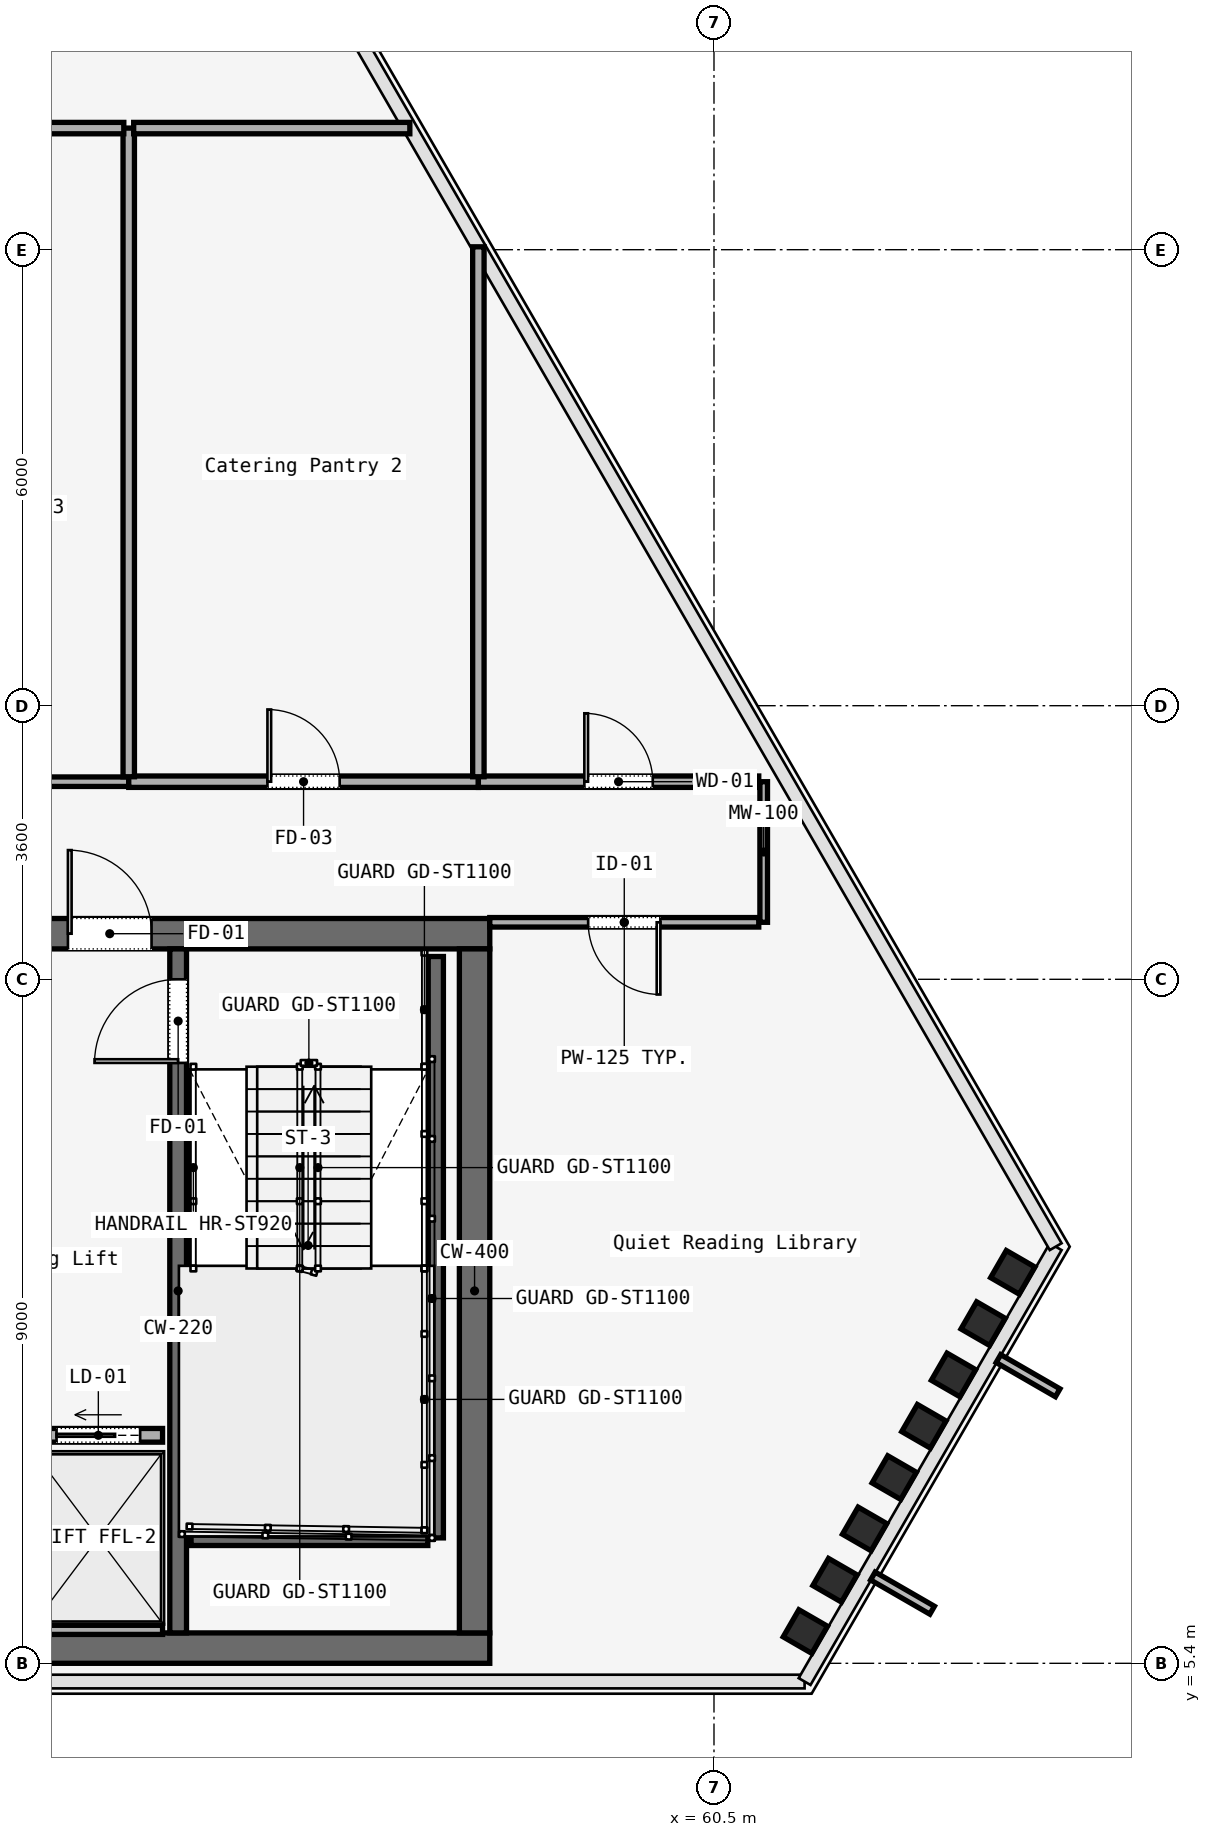
"""IFC4 building model, lengths in metres.
Left out: names, types, materials, properties, quantities, classifications, styles, units other than length and angle.
Written with IfcOpenShell. Run it as: python <this file> out.ifc"""

import sys

from ifc_helpers import new_model, si_unit, direction, frame, frame_2d, origin, origin_2d, place, context, subcontext, project, spatial, rectangle, i_section, extrude, element, fill, save


model = new_model("IFC4")
c1 = context("Model", 3, precision=1e-05, world=origin(), true_north=direction((0.0, 1.0)))
c2 = subcontext(c1, "Body", "Model", "MODEL_VIEW")
j1 = project(units=[si_unit("LENGTHUNIT", "METRE"), si_unit("PLANEANGLEUNIT", "RADIAN")], contexts=[c1])
p1 = place(None, origin())
s1 = spatial("IfcSite", under=j1, at=p1, CompositionType="ELEMENT")
p2 = place(p1, origin())
s2 = spatial("IfcBuilding", under=s1, at=p2, CompositionType="ELEMENT")
p3 = place(p2, frame((0.0, 0.0, 240.8)))
s3 = spatial("IfcBuildingStorey", under=s2, at=p3, CompositionType="ELEMENT", Elevation=240.8)
p4 = place(p3, frame((26.45, 15.0, 0.0), z_axis=(0.0, 0.0, 1.0), x_axis=(1.0, 0.0, 0.0)))
e1 = element("IfcWall", 1, at=p4, inside=s3, PredefinedType="SOLIDWALL", context=c2, shape_type="SweptSolid", body=[
    extrude(rectangle(XDim=31.1, YDim=0.4, at=frame_2d((15.55, 0.0))), origin(), (0.0, 0.0, 1.0), 3.58),
])
p5 = place(p4, frame((1.65, 0.0, 0.0)))
e2 = element("IfcOpeningElement", 2, at=p5, cuts=e1, PredefinedType="OPENING", context=c2, shape_type="SweptSolid", body=[
    extrude(rectangle(XDim=1.1, YDim=2.2, at=frame_2d((0.55, 1.1))), frame((0.0, 0.2, 0.0), z_axis=(0.0, -1.0, 0.0), x_axis=(1.0, 0.0, 0.0)), (0.0, 0.0, 1.0), 0.4),
])
p6 = place(p4, frame((13.65, 0.0, 0.0)))
e3 = element("IfcOpeningElement", 3, at=p6, cuts=e1, PredefinedType="OPENING", context=c2, shape_type="SweptSolid", body=[
    extrude(rectangle(XDim=1.1, YDim=2.2, at=frame_2d((0.55, 1.1))), frame((0.0, 0.2, 0.0), z_axis=(0.0, -1.0, 0.0), x_axis=(1.0, 0.0, 0.0)), (0.0, 0.0, 1.0), 0.4),
])
p7 = place(p4, frame((25.55, 0.0, 0.0)))
e4 = element("IfcOpeningElement", 4, at=p7, cuts=e1, PredefinedType="OPENING", context=c2, shape_type="SweptSolid", body=[
    extrude(rectangle(XDim=1.1, YDim=2.2, at=frame_2d((0.55, 1.1))), frame((0.0, 0.2, 0.0), z_axis=(0.0, -1.0, 0.0), x_axis=(1.0, 0.0, 0.0)), (0.0, 0.0, 1.0), 0.4),
])
p8 = place(p4, frame((19.35, 0.0, 0.0)))
e5 = element("IfcOpeningElement", 5, at=p8, cuts=e1, PredefinedType="OPENING", context=c2, shape_type="SweptSolid", body=[
    extrude(rectangle(XDim=1.1, YDim=2.2, at=frame_2d((0.55, 1.1))), frame((0.0, 0.2, 0.0), z_axis=(0.0, -1.0, 0.0), x_axis=(1.0, 0.0, 0.0)), (0.0, 0.0, 1.0), 0.4),
])
p9 = place(p4, frame((21.4, 0.0, 0.0)))
e6 = element("IfcOpeningElement", 6, at=p9, cuts=e1, PredefinedType="OPENING", context=c2, shape_type="SweptSolid", body=[
    extrude(rectangle(XDim=0.9, YDim=2.1, at=frame_2d((0.45, 1.05))), frame((0.0, 0.2, 0.0), z_axis=(0.0, -1.0, 0.0), x_axis=(1.0, 0.0, 0.0)), (0.0, 0.0, 1.0), 0.4),
])
p10 = place(p4, frame((6.04, 0.0, 0.0)))
e7 = element("IfcOpeningElement", 7, at=p10, cuts=e1, PredefinedType="OPENING", context=c2, shape_type="SweptSolid", body=[
    extrude(rectangle(XDim=0.95, YDim=2.2, at=frame_2d((0.475, 1.1))), frame((0.0, 0.2, 0.0), z_axis=(0.0, -1.0, 0.0), x_axis=(1.0, 0.0, 0.0)), (0.0, 0.0, 1.0), 0.4),
])
p11 = place(p4, frame((9.99, 0.0, 0.0)))
e8 = element("IfcOpeningElement", 8, at=p11, cuts=e1, PredefinedType="OPENING", context=c2, shape_type="SweptSolid", body=[
    extrude(rectangle(XDim=0.95, YDim=2.2, at=frame_2d((0.475, 1.1))), frame((0.0, 0.2, 0.0), z_axis=(0.0, -1.0, 0.0), x_axis=(1.0, 0.0, 0.0)), (0.0, 0.0, 1.0), 0.4),
])
p12 = place(p4, frame((23.35, 0.0, 0.0)))
e9 = element("IfcOpeningElement", 9, at=p12, cuts=e1, PredefinedType="OPENING", context=c2, shape_type="SweptSolid", body=[
    extrude(rectangle(XDim=1.3, YDim=2.3, at=frame_2d((0.65, 1.15))), frame((0.0, 0.2, 0.0), z_axis=(0.0, -1.0, 0.0), x_axis=(1.0, 0.0, 0.0)), (0.0, 0.0, 1.0), 0.4),
])
p13 = place(p3, frame((26.45, 5.6, 0.0), z_axis=(0.0, 0.0, 1.0), x_axis=(1.0, 0.0, 0.0)))
e10 = element("IfcWall", 10, at=p13, inside=s3, PredefinedType="SOLIDWALL", context=c2, shape_type="SweptSolid", body=[
    extrude(rectangle(XDim=31.1, YDim=0.4, at=frame_2d((15.55, 0.0))), origin(), (0.0, 0.0, 1.0), 3.58),
])
p14 = place(p3, frame((57.35, 5.8, 0.0), z_axis=(0.0, 0.0, 1.0), x_axis=(0.0, 1.0, 0.0)))
e11 = element("IfcWall", 11, at=p14, inside=s3, PredefinedType="SOLIDWALL", context=c2, shape_type="SweptSolid", body=[
    extrude(rectangle(XDim=9.0, YDim=0.4, at=frame_2d((4.5, 0.0))), origin(), (0.0, 0.0, 1.0), 3.58),
])
p15 = place(p3, frame((53.45, 5.8, 0.0), z_axis=(0.0, 0.0, 1.0), x_axis=(0.0, 1.0, 0.0)))
e12 = element("IfcWall", 12, at=p15, inside=s3, PredefinedType="SOLIDWALL", context=c2, shape_type="SweptSolid", body=[
    extrude(rectangle(XDim=9.0, YDim=0.22, at=frame_2d((4.5, 0.0))), origin(), (0.0, 0.0, 1.0), 3.58),
])
p16 = place(p15, frame((7.5, 0.0, 0.0)))
e13 = element("IfcOpeningElement", 13, at=p16, cuts=e12, PredefinedType="OPENING", context=c2, shape_type="SweptSolid", body=[
    extrude(rectangle(XDim=1.1, YDim=2.2, at=frame_2d((0.55, 1.1))), frame((0.0, 0.11, 0.0), z_axis=(0.0, -1.0, 0.0), x_axis=(1.0, 0.0, 0.0)), (0.0, 0.0, 1.0), 0.22),
])
for number, where, z_axis, x_axis in (
    (14, (61.702, 5.818, 0.0), (0.0, 0.0, 1.0), (0.5, 0.866, 0.0)),
    (15, (62.092, 6.493, 0.0), (0.0, 0.0, 1.0), (0.5, 0.866, 0.0)),
    (16, (62.482, 7.168, 0.0), (0.0, 0.0, 1.0), (0.5, 0.866, 0.0)),
    (17, (62.872, 7.844, 0.0), (0.0, 0.0, 1.0), (0.5, 0.866, 0.0)),
    (18, (63.262, 8.519, 0.0), (0.0, 0.0, 1.0), (0.5, 0.866, 0.0)),
    (19, (63.652, 9.194, 0.0), (0.0, 0.0, 1.0), (0.5, 0.866, 0.0)),
    (20, (64.041, 9.869, 0.0), (0.0, 0.0, 1.0), (0.5, 0.866, 0.0)),
    (21, (64.431, 10.544, 0.0), (0.0, 0.0, 1.0), (0.5, 0.866, 0.0)),
):
    element("IfcColumn", number, at=place(p3, frame(where, z_axis=z_axis, x_axis=x_axis)), inside=s3, PredefinedType="COLUMN", context=c2, shape_type="SweptSolid", body=[
        extrude(i_section(OverallWidth=0.412, OverallDepth=0.435, WebThickness=0.036, FlangeThickness=0.044, FilletRadius=0.015, at=origin_2d()), origin(), (0.0, 0.0, 1.0), 3.58),
    ])
p17 = place(p3, frame((56.84, 14.7, 0.0), z_axis=(0.0, 0.0, 1.0), x_axis=(0.0, -1.0, 0.0)))
e22 = element("IfcWall", 22, at=p17, inside=s3, PredefinedType="SOLIDWALL", context=c2, shape_type="SweptSolid", body=[
    extrude(rectangle(XDim=7.65, YDim=0.2, at=frame_2d((3.825, 0.0))), origin(), (0.0, 0.0, 1.0), 3.8),
])
p18 = place(p3, frame((53.62, 7.05, 0.0), z_axis=(0.0, 0.0, 1.0), x_axis=(1.0, 0.0, 0.0)))
e23 = element("IfcWall", 23, at=p18, inside=s3, PredefinedType="SOLIDWALL", context=c2, shape_type="SweptSolid", body=[
    extrude(rectangle(XDim=3.115, YDim=0.2, at=frame_2d((1.558, 0.0))), origin(), (0.0, 0.0, 1.0), 3.8),
])
p19 = place(p3, frame((51.555, 8.4, 0.0), z_axis=(0.0, 0.0, 1.0), x_axis=(1.0, 0.0, 0.0)))
e24 = element("IfcWall", 24, at=p19, inside=s3, PredefinedType="SOLIDWALL", context=c2, shape_type="SweptSolid", body=[
    extrude(rectangle(XDim=1.69, YDim=0.18, at=frame_2d((0.845, 0.0))), origin(), (0.0, 0.0, 1.0), 3.01),
])
p20 = place(p19, frame((0.295, 0.0, 0.0)))
e25 = element("IfcOpeningElement", 25, at=p20, cuts=e24, PredefinedType="OPENING", context=c2, shape_type="SweptSolid", body=[
    extrude(rectangle(XDim=1.1, YDim=2.2, at=frame_2d((0.55, 1.1))), frame((0.0, 0.09, 0.0), z_axis=(0.0, -1.0, 0.0), x_axis=(1.0, 0.0, 0.0)), (0.0, 0.0, 1.0), 0.18),
])
p21 = place(p3, frame((51.555, 5.84, 0.0), z_axis=(0.0, 0.0, 1.0), x_axis=(1.0, 0.0, 0.0)))
e26 = element("IfcWall", 26, at=p21, inside=s3, PredefinedType="SOLIDWALL", context=c2, shape_type="SweptSolid", body=[
    extrude(rectangle(XDim=1.69, YDim=0.12, at=frame_2d((0.845, 0.0))), origin(), (0.0, 0.0, 1.0), 3.01),
])
p22 = place(p3, frame((61.154, 17.0, 0.0), z_axis=(0.0, 0.0, 1.0), x_axis=(0.0, -1.0, 0.0)))
e27 = element("IfcWall", 27, at=p22, inside=s3, PredefinedType="MOVABLE", context=c2, shape_type="SweptSolid", body=[
    extrude(rectangle(XDim=1.85, YDim=0.1, at=frame_2d((0.925, 0.0))), origin(), (0.0, 0.0, 1.0), 3.01),
])
p23 = place(p3, frame((61.089, 15.15, 0.0), z_axis=(0.0, 0.0, 1.0), x_axis=(-1.0, 0.0, 0.0)))
e28 = element("IfcWall", 28, at=p23, inside=s3, PredefinedType="PARTITIONING", context=c2, shape_type="SweptSolid", body=[
    extrude(rectangle(XDim=3.539, YDim=0.125, at=frame_2d((1.77, 0.0))), origin(), (0.0, 0.0, 1.0), 3.01),
])
p24 = place(p23, frame((1.294, 0.0, 0.0)))
e29 = element("IfcOpeningElement", 29, at=p24, cuts=e28, PredefinedType="OPENING", context=c2, shape_type="SweptSolid", body=[
    extrude(rectangle(XDim=0.95, YDim=2.2, at=frame_2d((0.475, 1.1))), frame((0.0, 0.062, 0.0), z_axis=(0.0, -1.0, 0.0), x_axis=(1.0, 0.0, 0.0)), (0.0, 0.0, 1.0), 0.125),
])
p25 = place(p3, frame((48.2, 17.0, 0.0), z_axis=(0.0, 0.0, 1.0), x_axis=(1.0, 0.0, 0.0)))
e30 = element("IfcWall", 30, at=p25, inside=s3, PredefinedType="PARTITIONING", context=c2, shape_type="SweptSolid", body=[
    extrude(rectangle(XDim=4.6, YDim=0.125, at=frame_2d((2.3, 0.0))), origin(), (0.0, 0.0, 1.0), 3.01),
])
p26 = place(p25, frame((1.825, 0.0, 0.0)))
e31 = element("IfcOpeningElement", 31, at=p26, cuts=e30, PredefinedType="OPENING", context=c2, shape_type="SweptSolid", body=[
    extrude(rectangle(XDim=0.95, YDim=2.2, at=frame_2d((0.475, 1.1))), frame((0.0, 0.062, 0.0), z_axis=(0.0, -1.0, 0.0), x_axis=(1.0, 0.0, 0.0)), (0.0, 0.0, 1.0), 0.125),
])
p27 = place(p3, frame((52.8, 17.0, 0.0), z_axis=(0.0, 0.0, 1.0), x_axis=(1.0, 0.0, 0.0)))
e32 = element("IfcWall", 32, at=p27, inside=s3, PredefinedType="PARTITIONING", context=c2, shape_type="SweptSolid", body=[
    extrude(rectangle(XDim=4.6, YDim=0.15, at=frame_2d((2.3, 0.0))), origin(), (0.0, 0.0, 1.0), 3.01),
])
p28 = place(p27, frame((1.825, 0.0, 0.0)))
e33 = element("IfcOpeningElement", 33, at=p28, cuts=e32, PredefinedType="OPENING", context=c2, shape_type="SweptSolid", body=[
    extrude(rectangle(XDim=0.95, YDim=2.2, at=frame_2d((0.475, 1.1))), frame((0.0, 0.075, 0.0), z_axis=(0.0, -1.0, 0.0), x_axis=(1.0, 0.0, 0.0)), (0.0, 0.0, 1.0), 0.15),
])
p29 = place(p3, frame((57.4, 17.0, 0.0), z_axis=(0.0, 0.0, 1.0), x_axis=(1.0, 0.0, 0.0)))
e34 = element("IfcWall", 34, at=p29, inside=s3, PredefinedType="PARTITIONING", context=c2, shape_type="SweptSolid", body=[
    extrude(rectangle(XDim=3.689, YDim=0.15, at=frame_2d((1.845, 0.0))), origin(), (0.0, 0.0, 1.0), 3.01),
])
p30 = place(p29, frame((1.395, 0.0, 0.0)))
e35 = element("IfcOpeningElement", 35, at=p30, cuts=e34, PredefinedType="OPENING", context=c2, shape_type="SweptSolid", body=[
    extrude(rectangle(XDim=0.9, YDim=2.15, at=frame_2d((0.45, 1.075))), frame((0.0, 0.075, 0.0), z_axis=(0.0, -1.0, 0.0), x_axis=(1.0, 0.0, 0.0)), (0.0, 0.0, 1.0), 0.15),
])
p31 = place(p3, frame((57.4, 17.065, 0.0), z_axis=(0.0, 0.0, 1.0), x_axis=(0.0, 1.0, 0.0)))
e36 = element("IfcWall", 36, at=p31, inside=s3, PredefinedType="PARTITIONING", context=c2, shape_type="SweptSolid", body=[
    extrude(rectangle(XDim=6.973, YDim=0.15, at=frame_2d((3.487, 0.0))), origin(), (0.0, 0.0, 1.0), 3.01),
])
p32 = place(p3, frame((52.8, 17.065, 0.0), z_axis=(0.0, 0.0, 1.0), x_axis=(0.0, 1.0, 0.0)))
e37 = element("IfcWall", 37, at=p32, inside=s3, PredefinedType="PARTITIONING", context=c2, shape_type="SweptSolid", body=[
    extrude(rectangle(XDim=8.535, YDim=0.15, at=frame_2d((4.268, 0.0))), origin(), (0.0, 0.0, 1.0), 3.01),
])
p33 = place(p3, frame((52.865, 25.6, 0.0), z_axis=(0.0, 0.0, 1.0), x_axis=(1.0, 0.0, 0.0)))
e38 = element("IfcWall", 38, at=p33, inside=s3, PredefinedType="PARTITIONING", context=c2, shape_type="SweptSolid", body=[
    extrude(rectangle(XDim=3.633, YDim=0.15, at=frame_2d((1.817, 0.0))), origin(), (0.0, 0.0, 1.0), 3.01),
])
p34 = place(p3, frame((50.8, 25.6, 0.0), z_axis=(0.0, 0.0, 1.0), x_axis=(1.0, 0.0, 0.0)))
e39 = element("IfcWall", 39, at=p34, inside=s3, PredefinedType="PARTITIONING", context=c2, shape_type="SweptSolid", body=[
    extrude(rectangle(XDim=1.935, YDim=0.15, at=frame_2d((0.968, 0.0))), origin(), (0.0, 0.0, 1.0), 3.01),
])
p35 = place(p7, origin())
e40 = element("IfcDoor", 40, at=p35, inside=s3, OperationType="SINGLE_SWING_RIGHT", PredefinedType="DOOR", context=c2, shape_type="SweptSolid", body=[
    extrude(rectangle(XDim=1.1, YDim=2.2, at=frame_2d((0.55, 1.1))), frame((0.0, 0.025, 0.0), z_axis=(0.0, -1.0, 0.0), x_axis=(1.0, 0.0, 0.0)), (0.0, 0.0, 1.0), 0.05),
])
fill(e4, e40)
p36 = place(p16, origin())
e41 = element("IfcDoor", 41, at=p36, inside=s3, OperationType="SINGLE_SWING_LEFT", PredefinedType="DOOR", context=c2, shape_type="SweptSolid", body=[
    extrude(rectangle(XDim=1.1, YDim=2.2, at=frame_2d((0.55, 1.1))), frame((0.0, 0.025, 0.0), z_axis=(0.0, -1.0, 0.0), x_axis=(1.0, 0.0, 0.0)), (0.0, 0.0, 1.0), 0.05),
])
fill(e13, e41)
p37 = place(p20, origin())
e42 = element("IfcDoor", 42, at=p37, inside=s3, OperationType="SLIDING_TO_LEFT", PredefinedType="DOOR", context=c2, shape_type="SweptSolid", body=[
    extrude(rectangle(XDim=1.1, YDim=2.2, at=frame_2d((0.55, 1.1))), frame((0.0, 0.025, 0.0), z_axis=(0.0, -1.0, 0.0), x_axis=(1.0, 0.0, 0.0)), (0.0, 0.0, 1.0), 0.05),
])
fill(e25, e42)
p38 = place(p24, origin())
e43 = element("IfcDoor", 43, at=p38, inside=s3, OperationType="SINGLE_SWING_RIGHT", PredefinedType="DOOR", context=c2, shape_type="SweptSolid", body=[
    extrude(rectangle(XDim=0.95, YDim=2.2, at=frame_2d((0.475, 1.1))), frame((0.0, 0.025, 0.0), z_axis=(0.0, -1.0, 0.0), x_axis=(1.0, 0.0, 0.0)), (0.0, 0.0, 1.0), 0.05),
])
fill(e29, e43)
p39 = place(p30, origin())
e44 = element("IfcDoor", 44, at=p39, inside=s3, OperationType="SINGLE_SWING_LEFT", PredefinedType="DOOR", context=c2, shape_type="SweptSolid", body=[
    extrude(rectangle(XDim=0.9, YDim=2.15, at=frame_2d((0.45, 1.075))), frame((0.0, 0.025, 0.0), z_axis=(0.0, -1.0, 0.0), x_axis=(1.0, 0.0, 0.0)), (0.0, 0.0, 1.0), 0.05),
])
fill(e35, e44)
p40 = place(p28, origin())
e45 = element("IfcDoor", 45, at=p40, inside=s3, OperationType="SINGLE_SWING_LEFT", PredefinedType="DOOR", context=c2, shape_type="SweptSolid", body=[
    extrude(rectangle(XDim=0.95, YDim=2.2, at=frame_2d((0.475, 1.1))), frame((0.0, 0.025, 0.0), z_axis=(0.0, -1.0, 0.0), x_axis=(1.0, 0.0, 0.0)), (0.0, 0.0, 1.0), 0.05),
])
fill(e33, e45)
save(model, sys.argv[1])
